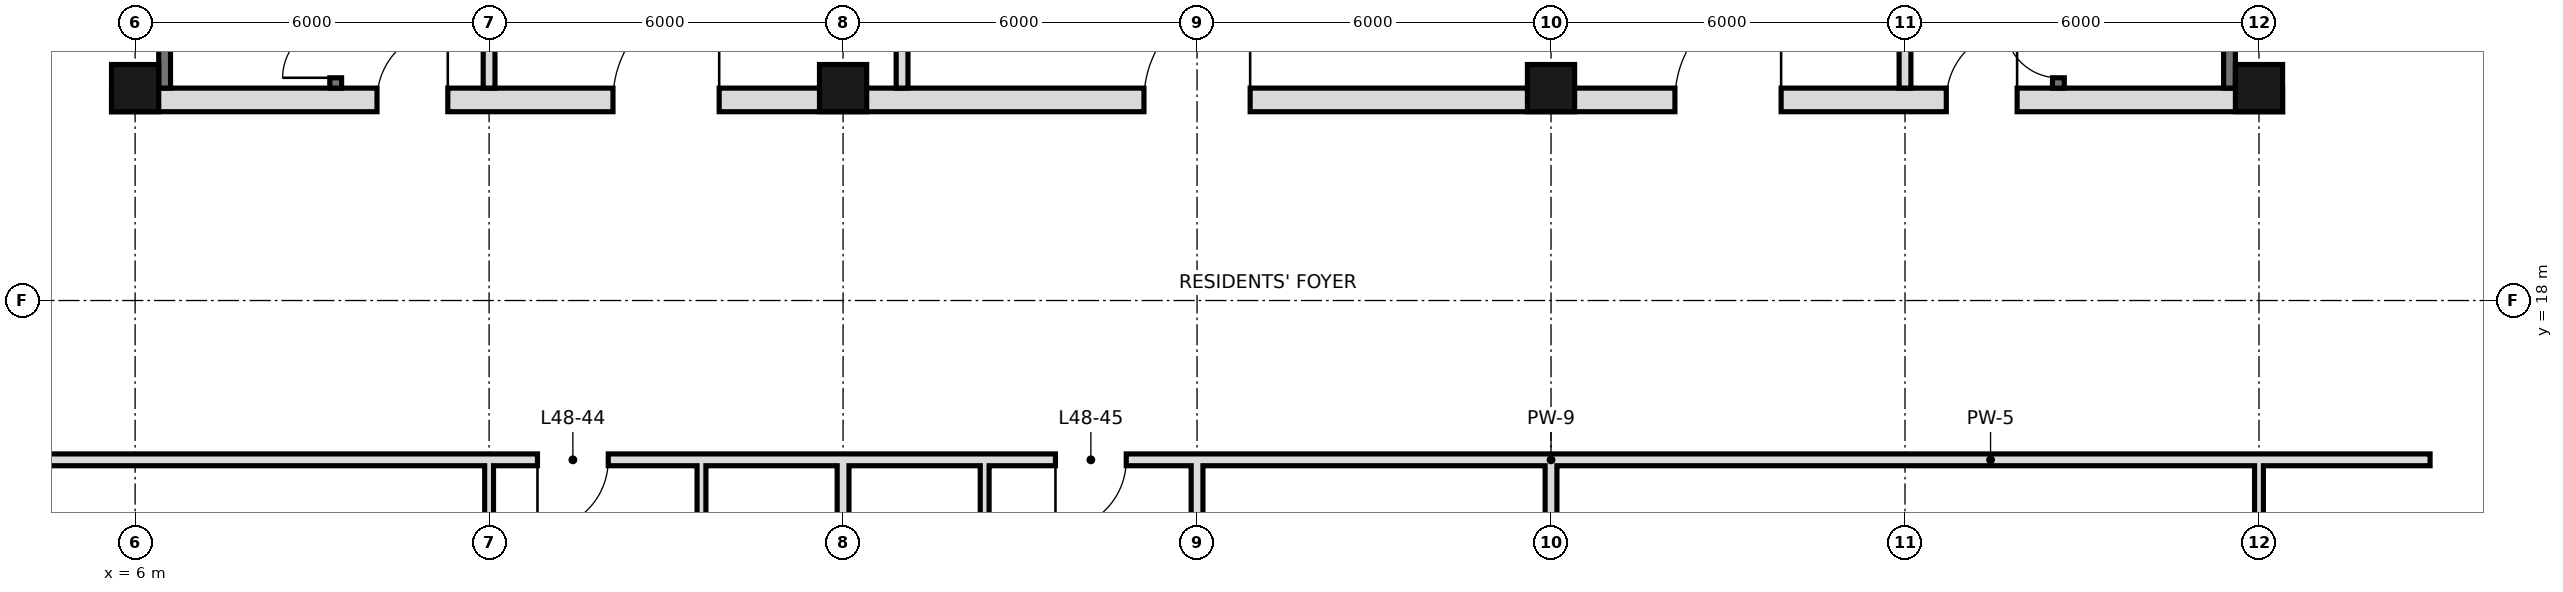
"""IFC4 building model, lengths in metres.
Left out: names, types, materials, properties, quantities, classifications, styles, units other than length and angle.
Written with IfcOpenShell. Run it as: python <this file> out.ifc"""

import sys

from ifc_helpers import new_model, si_unit, direction, frame, frame_2d, origin, origin_2d, place, context, subcontext, project, spatial, rectangle, hollow_rectangle, extrude, element, fill, save


model = new_model("IFC4")
c1 = context("Model", 3, precision=1e-05, world=origin(), true_north=direction((0.0, 1.0)))
c2 = subcontext(c1, "Body", "Model", "MODEL_VIEW")
j1 = project(units=[si_unit("LENGTHUNIT", "METRE"), si_unit("PLANEANGLEUNIT", "RADIAN")], contexts=[c1])
p1 = place(None, origin())
s1 = spatial("IfcSite", under=j1, at=p1, CompositionType="ELEMENT")
p2 = place(p1, origin())
s2 = spatial("IfcBuilding", under=s1, at=p2, CompositionType="ELEMENT")
p3 = place(p2, frame((0.0, 0.0, 206.4)))
s3 = spatial("IfcBuildingStorey", under=s2, at=p3, CompositionType="ELEMENT", Elevation=206.4)
for number, where, z_axis, x_axis in (
    (1, (6.0, 21.6, 0.0), (0.0, 0.0, 1.0), (1.0, 0.0, 0.0)),
    (2, (18.0, 21.6, 0.0), (0.0, 0.0, 1.0), (1.0, 0.0, 0.0)),
    (3, (30.0, 21.6, 0.0), (0.0, 0.0, 1.0), (1.0, 0.0, 0.0)),
    (4, (42.0, 21.6, 0.0), (0.0, 0.0, 1.0), (1.0, 0.0, 0.0)),
):
    element("IfcColumn", number, at=place(p3, frame(where, z_axis=z_axis, x_axis=x_axis)), inside=s3, PredefinedType="COLUMN", context=c2, shape_type="SweptSolid", body=[
        extrude(hollow_rectangle(XDim=0.8, YDim=0.8, WallThickness=0.04, at=origin_2d()), origin(), (0.0, 0.0, 1.0), 3.6),
    ])
p4 = place(p3, frame((12.0, 10.8, 0.0), z_axis=(0.0, 0.0, 1.0), x_axis=(0.0, 1.0, 0.0)))
e5 = element("IfcWall", 5, at=p4, inside=s3, PredefinedType="PARTITIONING", context=c2, shape_type="SweptSolid", body=[
    extrude(rectangle(XDim=4.5, YDim=0.15, at=frame_2d((2.25, 0.0))), origin(), (0.0, 0.0, 1.0), 2.68),
])
p5 = place(p3, frame((15.6, 10.8, 0.0), z_axis=(0.0, 0.0, 1.0), x_axis=(0.0, 1.0, 0.0)))
e6 = element("IfcWall", 6, at=p5, inside=s3, PredefinedType="PARTITIONING", context=c2, shape_type="SweptSolid", body=[
    extrude(rectangle(XDim=4.5, YDim=0.15, at=frame_2d((2.25, 0.0))), origin(), (0.0, 0.0, 1.0), 3.38),
])
p6 = place(p3, frame((18.0, -0.6, 0.0), z_axis=(0.0, 0.0, 1.0), x_axis=(0.0, 1.0, 0.0)))
e7 = element("IfcWall", 7, at=p6, inside=s3, PredefinedType="SOLIDWALL", context=c2, shape_type="SweptSolid", body=[
    extrude(rectangle(XDim=15.9, YDim=0.2, at=frame_2d((7.95, 0.0))), origin(), (0.0, 0.0, 1.0), 2.68),
])
p7 = place(p3, frame((20.4, 10.8, 0.0), z_axis=(0.0, 0.0, 1.0), x_axis=(0.0, 1.0, 0.0)))
e8 = element("IfcWall", 8, at=p7, inside=s3, PredefinedType="PARTITIONING", context=c2, shape_type="SweptSolid", body=[
    extrude(rectangle(XDim=4.5, YDim=0.15, at=frame_2d((2.25, 0.0))), origin(), (0.0, 0.0, 1.0), 3.38),
])
for number, where, z_axis, x_axis in (
    (9, (24.0, 10.8, 0.0), (0.0, 0.0, 1.0), (0.0, 1.0, 0.0)),
    (10, (30.0, 10.8, 0.0), (0.0, 0.0, 1.0), (0.0, 1.0, 0.0)),
):
    element("IfcWall", number, at=place(p3, frame(where, z_axis=z_axis, x_axis=x_axis)), inside=s3, PredefinedType="SOLIDWALL", context=c2, shape_type="SweptSolid", body=[
        extrude(rectangle(XDim=4.5, YDim=0.2, at=frame_2d((2.25, 0.0))), origin(), (0.0, 0.0, 1.0), 2.68),
    ])
p8 = place(p3, frame((42.0, 10.8, 0.0), z_axis=(0.0, 0.0, 1.0), x_axis=(0.0, 1.0, 0.0)))
e11 = element("IfcWall", 11, at=p8, inside=s3, PredefinedType="PARTITIONING", context=c2, shape_type="SweptSolid", body=[
    extrude(rectangle(XDim=4.5, YDim=0.15, at=frame_2d((2.25, 0.0))), origin(), (0.0, 0.0, 1.0), 2.68),
])
p9 = place(p3, frame((3.1, 15.3, 0.0), z_axis=(0.0, 0.0, 1.0), x_axis=(1.0, 0.0, 0.0)))
e12 = element("IfcWall", 12, at=p9, inside=s3, PredefinedType="SOLIDWALL", context=c2, shape_type="SweptSolid", body=[
    extrude(rectangle(XDim=20.9, YDim=0.2, at=frame_2d((10.45, 0.0))), origin(), (0.0, 0.0, 1.0), 2.68),
])
p10 = place(p9, frame((9.72, 0.0, 0.0)))
e13 = element("IfcOpeningElement", 13, at=p10, cuts=e12, PredefinedType="OPENING", context=c2, shape_type="SweptSolid", body=[
    extrude(rectangle(XDim=1.2, YDim=2.4, at=frame_2d((0.6, 1.2))), frame((0.0, 0.11, 0.0), z_axis=(0.0, -1.0, 0.0), x_axis=(1.0, 0.0, 0.0)), (0.0, 0.0, 1.0), 0.22),
])
p11 = place(p9, frame((18.5, 0.0, 0.0)))
e14 = element("IfcOpeningElement", 14, at=p11, cuts=e12, PredefinedType="OPENING", context=c2, shape_type="SweptSolid", body=[
    extrude(rectangle(XDim=1.2, YDim=2.4, at=frame_2d((0.6, 1.2))), frame((0.0, 0.11, 0.0), z_axis=(0.0, -1.0, 0.0), x_axis=(1.0, 0.0, 0.0)), (0.0, 0.0, 1.0), 0.22),
])
p12 = place(p3, frame((30.0, 15.3, 0.0), z_axis=(0.0, 0.0, 1.0), x_axis=(1.0, 0.0, 0.0)))
e15 = element("IfcWall", 15, at=p12, inside=s3, PredefinedType="SOLIDWALL", context=c2, shape_type="SweptSolid", body=[
    extrude(rectangle(XDim=14.9, YDim=0.2, at=frame_2d((7.45, 0.0))), origin(), (0.0, 0.0, 1.0), 2.68),
])
p13 = place(p3, frame((24.0, 15.3, 0.0), z_axis=(0.0, 0.0, 1.0), x_axis=(1.0, 0.0, 0.0)))
e16 = element("IfcWall", 16, at=p13, inside=s3, PredefinedType="SOLIDWALL", context=c2, shape_type="SweptSolid", body=[
    extrude(rectangle(XDim=6.0, YDim=0.2, at=frame_2d((3.0, 0.0))), origin(), (0.0, 0.0, 1.0), 2.68),
])
for number, where, z_axis, x_axis in (
    (17, (6.5, 21.6, 0.0), (0.0, 0.0, 1.0), (0.0, 1.0, 0.0)),
    (18, (41.5, 21.6, 0.0), (0.0, 0.0, 1.0), (0.0, 1.0, 0.0)),
):
    element("IfcWall", number, at=place(p3, frame(where, z_axis=z_axis, x_axis=x_axis)), inside=s3, PredefinedType="SOLIDWALL", context=c2, shape_type="SweptSolid", body=[
        extrude(rectangle(XDim=23.5, YDim=0.2, at=frame_2d((11.75, 0.0))), origin(), (0.0, 0.0, 1.0), 3.38),
    ])
p14 = place(p3, frame((5.6, 21.4, 0.0), z_axis=(0.0, 0.0, 1.0), x_axis=(1.0, 0.0, 0.0)))
e19 = element("IfcWall", 19, at=p14, inside=s3, PredefinedType="SOLIDWALL", context=c2, shape_type="SweptSolid", body=[
    extrude(rectangle(XDim=36.8, YDim=0.4, at=frame_2d((18.4, 0.0))), origin(), (0.0, 0.0, 1.0), 3.38),
])
p15 = place(p14, frame((8.5, 0.0, 0.0)))
e20 = element("IfcOpeningElement", 20, at=p15, cuts=e19, PredefinedType="OPENING", context=c2, shape_type="SweptSolid", body=[
    extrude(rectangle(XDim=1.8, YDim=2.1, at=frame_2d((0.9, 1.05))), frame((0.0, 0.21, 0.0), z_axis=(0.0, -1.0, 0.0), x_axis=(1.0, 0.0, 0.0)), (0.0, 0.0, 1.0), 0.42),
])
p16 = place(p14, frame((17.5, 0.0, 0.0)))
e21 = element("IfcOpeningElement", 21, at=p16, cuts=e19, PredefinedType="OPENING", context=c2, shape_type="SweptSolid", body=[
    extrude(rectangle(XDim=1.8, YDim=2.1, at=frame_2d((0.9, 1.05))), frame((0.0, 0.21, 0.0), z_axis=(0.0, -1.0, 0.0), x_axis=(1.0, 0.0, 0.0)), (0.0, 0.0, 1.0), 0.42),
])
p17 = place(p14, frame((26.5, 0.0, 0.0)))
e22 = element("IfcOpeningElement", 22, at=p17, cuts=e19, PredefinedType="OPENING", context=c2, shape_type="SweptSolid", body=[
    extrude(rectangle(XDim=1.8, YDim=2.1, at=frame_2d((0.9, 1.05))), frame((0.0, 0.21, 0.0), z_axis=(0.0, -1.0, 0.0), x_axis=(1.0, 0.0, 0.0)), (0.0, 0.0, 1.0), 0.42),
])
p18 = place(p14, frame((4.5, 0.0, 0.0)))
e23 = element("IfcOpeningElement", 23, at=p18, cuts=e19, PredefinedType="OPENING", context=c2, shape_type="SweptSolid", body=[
    extrude(rectangle(XDim=1.2, YDim=2.1, at=frame_2d((0.6, 1.05))), frame((0.0, 0.21, 0.0), z_axis=(0.0, -1.0, 0.0), x_axis=(1.0, 0.0, 0.0)), (0.0, 0.0, 1.0), 0.42),
])
p19 = place(p14, frame((31.1, 0.0, 0.0)))
e24 = element("IfcOpeningElement", 24, at=p19, cuts=e19, PredefinedType="OPENING", context=c2, shape_type="SweptSolid", body=[
    extrude(rectangle(XDim=1.2, YDim=2.1, at=frame_2d((0.6, 1.05))), frame((0.0, 0.21, 0.0), z_axis=(0.0, -1.0, 0.0), x_axis=(1.0, 0.0, 0.0)), (0.0, 0.0, 1.0), 0.42),
])
p20 = place(p3, frame((19.0, 21.6, 0.0), z_axis=(0.0, 0.0, 1.0), x_axis=(0.0, 1.0, 0.0)))
e25 = element("IfcWall", 25, at=p20, inside=s3, PredefinedType="PARTITIONING", context=c2, shape_type="SweptSolid", body=[
    extrude(rectangle(XDim=6.0, YDim=0.2, at=frame_2d((3.0, 0.0))), origin(), (0.0, 0.0, 1.0), 3.38),
])
p21 = place(p20, frame((2.1, 0.0, 0.0)))
e26 = element("IfcOpeningElement", 26, at=p21, cuts=e25, PredefinedType="OPENING", context=c2, shape_type="SweptSolid", body=[
    extrude(rectangle(XDim=1.8, YDim=2.1, at=frame_2d((0.9, 1.05))), frame((0.0, 0.11, 0.0), z_axis=(0.0, -1.0, 0.0), x_axis=(1.0, 0.0, 0.0)), (0.0, 0.0, 1.0), 0.22),
])
for number, where, z_axis, x_axis in (
    (27, (12.0, 21.6, 0.0), (0.0, 0.0, 1.0), (0.0, 1.0, 0.0)),
    (28, (36.0, 21.6, 0.0), (0.0, 0.0, 1.0), (0.0, 1.0, 0.0)),
):
    element("IfcWall", number, at=place(p3, frame(where, z_axis=z_axis, x_axis=x_axis)), inside=s3, PredefinedType="PARTITIONING", context=c2, shape_type="SweptSolid", body=[
        extrude(rectangle(XDim=6.1, YDim=0.2, at=frame_2d((3.05, 0.0))), origin(), (0.0, 0.0, 1.0), 3.38),
    ])
p22 = place(p3, frame((38.6, 21.6, 0.0), z_axis=(0.0, 0.0, 1.0), x_axis=(0.0, 1.0, 0.0)))
e29 = element("IfcWall", 29, at=p22, inside=s3, PredefinedType="SOLIDWALL", context=c2, shape_type="SweptSolid", body=[
    extrude(rectangle(XDim=23.4, YDim=0.2, at=frame_2d((11.7, 0.0))), origin(), (0.0, 0.0, 1.0), 3.38),
])
p23 = place(p22, frame((7.0, 0.0, 0.0)))
e30 = element("IfcOpeningElement", 30, at=p23, cuts=e29, PredefinedType="OPENING", context=c2, shape_type="SweptSolid", body=[
    extrude(rectangle(XDim=1.1, YDim=2.1, at=frame_2d((0.55, 1.05))), frame((0.0, 0.11, 0.0), z_axis=(0.0, -1.0, 0.0), x_axis=(1.0, 0.0, 0.0)), (0.0, 0.0, 1.0), 0.22),
])
p24 = place(p22, frame((10.1, 0.0, 0.0)))
e31 = element("IfcOpeningElement", 31, at=p24, cuts=e29, PredefinedType="OPENING", context=c2, shape_type="SweptSolid", body=[
    extrude(rectangle(XDim=1.1, YDim=2.1, at=frame_2d((0.55, 1.05))), frame((0.0, 0.11, 0.0), z_axis=(0.0, -1.0, 0.0), x_axis=(1.0, 0.0, 0.0)), (0.0, 0.0, 1.0), 0.22),
])
p25 = place(p22, frame((13.2, 0.0, 0.0)))
e32 = element("IfcOpeningElement", 32, at=p25, cuts=e29, PredefinedType="OPENING", context=c2, shape_type="SweptSolid", body=[
    extrude(rectangle(XDim=1.1, YDim=2.1, at=frame_2d((0.55, 1.05))), frame((0.0, 0.11, 0.0), z_axis=(0.0, -1.0, 0.0), x_axis=(1.0, 0.0, 0.0)), (0.0, 0.0, 1.0), 0.22),
])
p26 = place(p22, frame((22.1, 0.0, 0.0)))
e33 = element("IfcOpeningElement", 33, at=p26, cuts=e29, PredefinedType="OPENING", context=c2, shape_type="SweptSolid", body=[
    extrude(rectangle(XDim=1.0, YDim=2.1, at=frame_2d((0.5, 1.05))), frame((0.0, 0.11, 0.0), z_axis=(0.0, -1.0, 0.0), x_axis=(1.0, 0.0, 0.0)), (0.0, 0.0, 1.0), 0.22),
])
p27 = place(p22, frame((0.175, 0.0, 0.0)))
e34 = element("IfcOpeningElement", 34, at=p27, cuts=e29, PredefinedType="OPENING", context=c2, shape_type="SweptSolid", body=[
    extrude(rectangle(XDim=0.9, YDim=2.1, at=frame_2d((0.45, 1.05))), frame((0.0, 0.11, 0.0), z_axis=(0.0, -1.0, 0.0), x_axis=(1.0, 0.0, 0.0)), (0.0, 0.0, 1.0), 0.22),
])
p28 = place(p3, frame((9.4, 21.6, 0.0), z_axis=(0.0, 0.0, 1.0), x_axis=(0.0, 1.0, 0.0)))
e35 = element("IfcWall", 35, at=p28, inside=s3, PredefinedType="SOLIDWALL", context=c2, shape_type="SweptSolid", body=[
    extrude(rectangle(XDim=23.4, YDim=0.2, at=frame_2d((11.7, 0.0))), origin(), (0.0, 0.0, 1.0), 3.38),
])
p29 = place(p28, frame((7.95, 0.0, 0.0)))
e36 = element("IfcOpeningElement", 36, at=p29, cuts=e35, PredefinedType="OPENING", context=c2, shape_type="SweptSolid", body=[
    extrude(rectangle(XDim=1.0, YDim=2.1, at=frame_2d((0.5, 1.05))), frame((0.0, 0.11, 0.0), z_axis=(0.0, -1.0, 0.0), x_axis=(1.0, 0.0, 0.0)), (0.0, 0.0, 1.0), 0.22),
])
p30 = place(p28, frame((12.6, 0.0, 0.0)))
e37 = element("IfcOpeningElement", 37, at=p30, cuts=e35, PredefinedType="OPENING", context=c2, shape_type="SweptSolid", body=[
    extrude(rectangle(XDim=1.0, YDim=2.1, at=frame_2d((0.5, 1.05))), frame((0.0, 0.11, 0.0), z_axis=(0.0, -1.0, 0.0), x_axis=(1.0, 0.0, 0.0)), (0.0, 0.0, 1.0), 0.22),
])
p31 = place(p28, frame((22.1, 0.0, 0.0)))
e38 = element("IfcOpeningElement", 38, at=p31, cuts=e35, PredefinedType="OPENING", context=c2, shape_type="SweptSolid", body=[
    extrude(rectangle(XDim=1.0, YDim=2.1, at=frame_2d((0.5, 1.05))), frame((0.0, 0.11, 0.0), z_axis=(0.0, -1.0, 0.0), x_axis=(1.0, 0.0, 0.0)), (0.0, 0.0, 1.0), 0.22),
])
p32 = place(p28, frame((0.175, 0.0, 0.0)))
e39 = element("IfcOpeningElement", 39, at=p32, cuts=e35, PredefinedType="OPENING", context=c2, shape_type="SweptSolid", body=[
    extrude(rectangle(XDim=0.9, YDim=2.1, at=frame_2d((0.45, 1.05))), frame((0.0, 0.11, 0.0), z_axis=(0.0, -1.0, 0.0), x_axis=(1.0, 0.0, 0.0)), (0.0, 0.0, 1.0), 0.22),
])
p33 = place(p10, frame((1.2, 0.0, 0.0), z_axis=(0.0, 0.0, 1.0), x_axis=(-1.0, 0.0, 0.0)))
e40 = element("IfcDoor", 40, at=p33, inside=s3, OperationType="SINGLE_SWING_RIGHT", PredefinedType="DOOR", context=c2, shape_type="SweptSolid", body=[
    extrude(rectangle(XDim=1.2, YDim=2.4, at=frame_2d((0.6, 1.2))), frame((0.0, 0.025, 0.0), z_axis=(0.0, -1.0, 0.0), x_axis=(1.0, 0.0, 0.0)), (0.0, 0.0, 1.0), 0.05),
])
fill(e13, e40)
p34 = place(p11, frame((1.2, 0.0, 0.0), z_axis=(0.0, 0.0, 1.0), x_axis=(-1.0, 0.0, 0.0)))
e41 = element("IfcDoor", 41, at=p34, inside=s3, OperationType="SINGLE_SWING_RIGHT", PredefinedType="DOOR", context=c2, shape_type="SweptSolid", body=[
    extrude(rectangle(XDim=1.2, YDim=2.4, at=frame_2d((0.6, 1.2))), frame((0.0, 0.025, 0.0), z_axis=(0.0, -1.0, 0.0), x_axis=(1.0, 0.0, 0.0)), (0.0, 0.0, 1.0), 0.05),
])
fill(e14, e41)
p35 = place(p15, frame((1.8, 0.0, 0.0), z_axis=(0.0, 0.0, 1.0), x_axis=(-1.0, 0.0, 0.0)))
e42 = element("IfcDoor", 42, at=p35, inside=s3, OperationType="SINGLE_SWING_LEFT", PredefinedType="DOOR", context=c2, shape_type="SweptSolid", body=[
    extrude(rectangle(XDim=1.8, YDim=2.1, at=frame_2d((0.9, 1.05))), frame((0.0, 0.025, 0.0), z_axis=(0.0, -1.0, 0.0), x_axis=(1.0, 0.0, 0.0)), (0.0, 0.0, 1.0), 0.05),
])
fill(e20, e42)
p36 = place(p16, frame((1.8, 0.0, 0.0), z_axis=(0.0, 0.0, 1.0), x_axis=(-1.0, 0.0, 0.0)))
e43 = element("IfcDoor", 43, at=p36, inside=s3, OperationType="SINGLE_SWING_LEFT", PredefinedType="DOOR", context=c2, shape_type="SweptSolid", body=[
    extrude(rectangle(XDim=1.8, YDim=2.1, at=frame_2d((0.9, 1.05))), frame((0.0, 0.025, 0.0), z_axis=(0.0, -1.0, 0.0), x_axis=(1.0, 0.0, 0.0)), (0.0, 0.0, 1.0), 0.05),
])
fill(e21, e43)
p37 = place(p17, frame((1.8, 0.0, 0.0), z_axis=(0.0, 0.0, 1.0), x_axis=(-1.0, 0.0, 0.0)))
e44 = element("IfcDoor", 44, at=p37, inside=s3, OperationType="SINGLE_SWING_LEFT", PredefinedType="DOOR", context=c2, shape_type="SweptSolid", body=[
    extrude(rectangle(XDim=1.8, YDim=2.1, at=frame_2d((0.9, 1.05))), frame((0.0, 0.025, 0.0), z_axis=(0.0, -1.0, 0.0), x_axis=(1.0, 0.0, 0.0)), (0.0, 0.0, 1.0), 0.05),
])
fill(e22, e44)
p38 = place(p18, frame((1.2, 0.0, 0.0), z_axis=(0.0, 0.0, 1.0), x_axis=(-1.0, 0.0, 0.0)))
e45 = element("IfcDoor", 45, at=p38, inside=s3, OperationType="SINGLE_SWING_LEFT", PredefinedType="DOOR", context=c2, shape_type="SweptSolid", body=[
    extrude(rectangle(XDim=1.2, YDim=2.1, at=frame_2d((0.6, 1.05))), frame((0.0, 0.025, 0.0), z_axis=(0.0, -1.0, 0.0), x_axis=(1.0, 0.0, 0.0)), (0.0, 0.0, 1.0), 0.05),
])
fill(e23, e45)
p39 = place(p19, frame((1.2, 0.0, 0.0), z_axis=(0.0, 0.0, 1.0), x_axis=(-1.0, 0.0, 0.0)))
e46 = element("IfcDoor", 46, at=p39, inside=s3, OperationType="SINGLE_SWING_LEFT", PredefinedType="DOOR", context=c2, shape_type="SweptSolid", body=[
    extrude(rectangle(XDim=1.2, YDim=2.1, at=frame_2d((0.6, 1.05))), frame((0.0, 0.025, 0.0), z_axis=(0.0, -1.0, 0.0), x_axis=(1.0, 0.0, 0.0)), (0.0, 0.0, 1.0), 0.05),
])
fill(e24, e46)
p40 = place(p32, origin())
e47 = element("IfcDoor", 47, at=p40, inside=s3, OperationType="SINGLE_SWING_LEFT", PredefinedType="DOOR", context=c2, shape_type="SweptSolid", body=[
    extrude(rectangle(XDim=0.9, YDim=2.1, at=frame_2d((0.45, 1.05))), frame((0.0, 0.025, 0.0), z_axis=(0.0, -1.0, 0.0), x_axis=(1.0, 0.0, 0.0)), (0.0, 0.0, 1.0), 0.05),
])
fill(e39, e47)
p41 = place(p27, frame((0.9, 0.0, 0.0), z_axis=(0.0, 0.0, 1.0), x_axis=(-1.0, 0.0, 0.0)))
e48 = element("IfcDoor", 48, at=p41, inside=s3, OperationType="SINGLE_SWING_LEFT", PredefinedType="DOOR", context=c2, shape_type="SweptSolid", body=[
    extrude(rectangle(XDim=0.9, YDim=2.1, at=frame_2d((0.45, 1.05))), frame((0.0, 0.025, 0.0), z_axis=(0.0, -1.0, 0.0), x_axis=(1.0, 0.0, 0.0)), (0.0, 0.0, 1.0), 0.05),
])
fill(e34, e48)
save(model, sys.argv[1])
